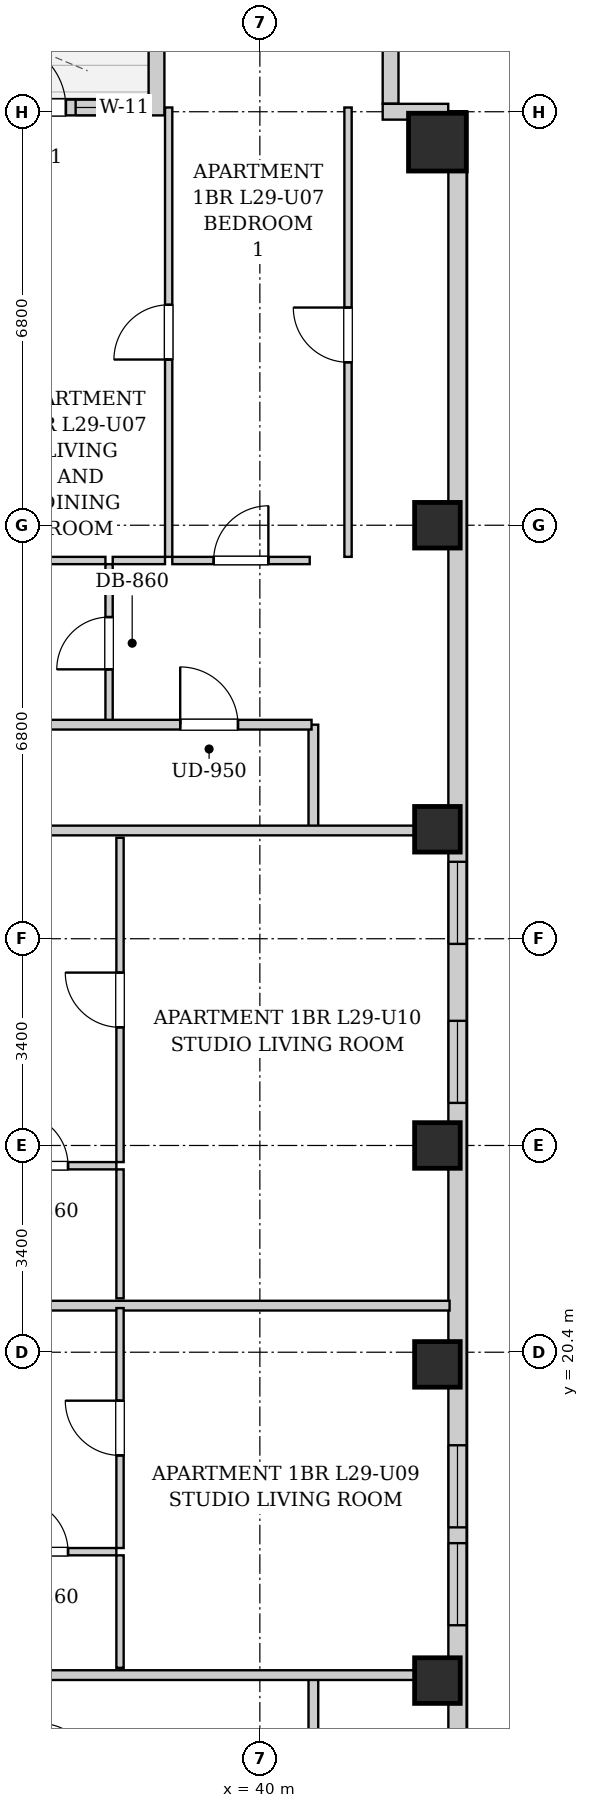
"""IFC4 building model, lengths in metres.
Left out: names, types, materials, properties, quantities, classifications, styles, units other than length and angle.
Written with IfcOpenShell. Run it as: python <this file> out.ifc"""

import sys

from ifc_helpers import new_model, si_unit, direction, frame, frame_2d, origin, origin_2d, place, context, subcontext, project, spatial, rectangle, extrude, element, fill, save


model = new_model("IFC4")
c1 = context("Model", 3, precision=1e-05, world=origin(), true_north=direction((0.0, 1.0)))
c2 = subcontext(c1, "Body", "Model", "MODEL_VIEW")
j1 = project(units=[si_unit("LENGTHUNIT", "METRE"), si_unit("PLANEANGLEUNIT", "RADIAN")], contexts=[c1])
p1 = place(None, origin())
s1 = spatial("IfcSite", under=j1, at=p1, CompositionType="ELEMENT")
p2 = place(p1, origin())
s2 = spatial("IfcBuilding", under=s1, at=p2, CompositionType="ELEMENT")
p3 = place(p2, frame((0.0, 0.0, 103.9)))
s3 = spatial("IfcBuildingStorey", under=s2, at=p3, CompositionType="ELEMENT", Elevation=103.9)
for number, where, z_axis, x_axis in (
    (1, (42.92, 15.0, 0.0), (0.0, 0.0, 1.0), (1.0, 0.0, 0.0)),
    (2, (42.92, 20.2, 0.0), (0.0, 0.0, 1.0), (1.0, 0.0, 0.0)),
    (3, (42.92, 23.8, 0.0), (0.0, 0.0, 1.0), (1.0, 0.0, 0.0)),
    (4, (42.92, 29.0, 0.0), (0.0, 0.0, 1.0), (1.0, 0.0, 0.0)),
    (5, (42.92, 34.0, 0.0), (0.0, 0.0, 1.0), (1.0, 0.0, 0.0)),
):
    element("IfcColumn", number, at=place(p3, frame(where, z_axis=z_axis, x_axis=x_axis)), inside=s3, PredefinedType="COLUMN", context=c2, shape_type="SweptSolid", body=[
        extrude(rectangle(XDim=0.75, YDim=0.75, at=origin_2d()), origin(), (0.0, 0.0, 1.0), 3.2),
    ])
p4 = place(p3, frame((42.92, 40.3, 0.0), z_axis=(0.0, 0.0, 1.0), x_axis=(1.0, 0.0, 0.0)))
e6 = element("IfcColumn", 6, at=p4, inside=s3, PredefinedType="COLUMN", context=c2, shape_type="SweptSolid", body=[
    extrude(rectangle(XDim=0.95, YDim=0.95, at=origin_2d()), origin(), (0.0, 0.0, 1.0), 3.2),
])
p5 = place(p3, frame((33.284, 40.87, 0.0), z_axis=(0.0, 0.0, 1.0), x_axis=(1.0, 0.0, 0.0)))
e7 = element("IfcWall", 7, at=p5, inside=s3, PredefinedType="SOLIDWALL", context=c2, shape_type="SweptSolid", body=[
    extrude(rectangle(XDim=4.882, YDim=0.26, at=frame_2d((2.441, 0.0))), origin(), (0.0, 0.0, 1.0), 2.94),
])
p6 = place(p5, frame((2.426, 0.0, 0.0)))
e8 = element("IfcOpeningElement", 8, at=p6, cuts=e7, PredefinedType="OPENING", context=c2, shape_type="SweptSolid", body=[
    extrude(rectangle(XDim=1.1, YDim=2.0, at=frame_2d((0.55, 1.0))), frame((0.0, 0.14, 0.0), z_axis=(0.0, -1.0, 0.0), x_axis=(1.0, 0.0, 0.0)), (0.0, 0.0, 1.0), 0.28),
])
p7 = place(p5, frame((0.426, 0.0, 0.85)))
e9 = element("IfcOpeningElement", 9, at=p7, cuts=e7, PredefinedType="OPENING", context=c2, shape_type="SweptSolid", body=[
    extrude(rectangle(XDim=1.6, YDim=1.65, at=frame_2d((0.8, 0.825))), frame((0.0, 0.14, 0.0), z_axis=(0.0, -1.0, 0.0), x_axis=(1.0, 0.0, 0.0)), (0.0, 0.0, 1.0), 0.28),
])
p8 = place(p5, frame((3.686, 0.0, 0.55)))
e10 = element("IfcOpeningElement", 10, at=p8, cuts=e7, PredefinedType="OPENING", context=c2, shape_type="SweptSolid", body=[
    extrude(rectangle(XDim=0.85, YDim=1.2, at=frame_2d((0.425, 0.6))), frame((0.0, 0.14, 0.0), z_axis=(0.0, -1.0, 0.0), x_axis=(1.0, 0.0, 0.0)), (0.0, 0.0, 1.0), 0.28),
])
p9 = place(p3, frame((38.3, 40.74, 0.0), z_axis=(0.0, 0.0, 1.0), x_axis=(0.0, 1.0, 0.0)))
e11 = element("IfcWall", 11, at=p9, inside=s3, PredefinedType="SOLIDWALL", context=c2, shape_type="SweptSolid", body=[
    extrude(rectangle(XDim=2.4, YDim=0.26, at=frame_2d((1.2, 0.0))), origin(), (0.0, 0.0, 1.0), 2.94),
])
p10 = place(p3, frame((43.25, 40.8, 0.0), z_axis=(0.0, 0.0, 1.0), x_axis=(0.0, -1.0, 0.0)))
e12 = element("IfcWall", 12, at=p10, inside=s3, PredefinedType="SOLIDWALL", context=c2, shape_type="SweptSolid", body=[
    extrude(rectangle(XDim=38.3, YDim=0.3, at=frame_2d((19.15, 0.0))), origin(), (0.0, 0.0, 1.0), 2.94),
])
p11 = place(p10, frame((33.495, 0.0, 0.55)))
e13 = element("IfcOpeningElement", 13, at=p11, cuts=e12, PredefinedType="OPENING", context=c2, shape_type="SweptSolid", body=[
    extrude(rectangle(XDim=1.35, YDim=1.2, at=frame_2d((0.675, 0.6))), frame((0.0, 0.16, 0.0), z_axis=(0.0, -1.0, 0.0), x_axis=(1.0, 0.0, 0.0)), (0.0, 0.0, 1.0), 0.32),
])
p12 = place(p10, frame((31.735, 0.0, 0.55)))
e14 = element("IfcOpeningElement", 14, at=p12, cuts=e12, PredefinedType="OPENING", context=c2, shape_type="SweptSolid", body=[
    extrude(rectangle(XDim=1.35, YDim=1.2, at=frame_2d((0.675, 0.6))), frame((0.0, 0.16, 0.0), z_axis=(0.0, -1.0, 0.0), x_axis=(1.0, 0.0, 0.0)), (0.0, 0.0, 1.0), 0.32),
])
p13 = place(p10, frame((21.93, 0.0, 0.55)))
e15 = element("IfcOpeningElement", 15, at=p13, cuts=e12, PredefinedType="OPENING", context=c2, shape_type="SweptSolid", body=[
    extrude(rectangle(XDim=1.35, YDim=1.2, at=frame_2d((0.675, 0.6))), frame((0.0, 0.16, 0.0), z_axis=(0.0, -1.0, 0.0), x_axis=(1.0, 0.0, 0.0)), (0.0, 0.0, 1.0), 0.32),
])
p14 = place(p10, frame((23.54, 0.0, 0.55)))
e16 = element("IfcOpeningElement", 16, at=p14, cuts=e12, PredefinedType="OPENING", context=c2, shape_type="SweptSolid", body=[
    extrude(rectangle(XDim=1.35, YDim=1.2, at=frame_2d((0.675, 0.6))), frame((0.0, 0.16, 0.0), z_axis=(0.0, -1.0, 0.0), x_axis=(1.0, 0.0, 0.0)), (0.0, 0.0, 1.0), 0.32),
])
p15 = place(p10, frame((14.95, 0.0, 0.55)))
e17 = element("IfcOpeningElement", 17, at=p15, cuts=e12, PredefinedType="OPENING", context=c2, shape_type="SweptSolid", body=[
    extrude(rectangle(XDim=1.35, YDim=1.2, at=frame_2d((0.675, 0.6))), frame((0.0, 0.16, 0.0), z_axis=(0.0, -1.0, 0.0), x_axis=(1.0, 0.0, 0.0)), (0.0, 0.0, 1.0), 0.32),
])
p16 = place(p10, frame((12.335, 0.0, 0.55)))
e18 = element("IfcOpeningElement", 18, at=p16, cuts=e12, PredefinedType="OPENING", context=c2, shape_type="SweptSolid", body=[
    extrude(rectangle(XDim=1.35, YDim=1.2, at=frame_2d((0.675, 0.6))), frame((0.0, 0.16, 0.0), z_axis=(0.0, -1.0, 0.0), x_axis=(1.0, 0.0, 0.0)), (0.0, 0.0, 1.0), 0.32),
])
p17 = place(p3, frame((42.15, 41.918, 0.0), z_axis=(0.0, 0.0, 1.0), x_axis=(0.0, -1.0, 0.0)))
e19 = element("IfcWall", 19, at=p17, inside=s3, PredefinedType="SOLIDWALL", context=c2, shape_type="SweptSolid", body=[
    extrude(rectangle(XDim=0.986, YDim=0.26, at=frame_2d((0.493, 0.0))), origin(), (0.0, 0.0, 1.0), 2.94),
])
p18 = place(p3, frame((42.02, 40.8, 0.0), z_axis=(0.0, 0.0, 1.0), x_axis=(1.0, 0.0, 0.0)))
e20 = element("IfcWall", 20, at=p18, inside=s3, PredefinedType="SOLIDWALL", context=c2, shape_type="SweptSolid", body=[
    extrude(rectangle(XDim=1.078, YDim=0.26, at=frame_2d((0.539, 0.0))), origin(), (0.0, 0.0, 1.0), 2.94),
])
for number, where, z_axis, x_axis in (
    (21, (40.88, 13.35, 0.0), (0.0, 0.0, 1.0), (0.0, 1.0, 0.0)),
    (22, (40.88, 28.98, 0.0), (0.0, 0.0, 1.0), (0.0, 1.0, 0.0)),
):
    element("IfcWall", number, at=place(p3, frame(where, z_axis=z_axis, x_axis=x_axis)), inside=s3, PredefinedType="PARTITIONING", context=c2, shape_type="SweptSolid", body=[
        extrude(rectangle(XDim=1.74, YDim=0.16, at=frame_2d((0.87, 0.0))), origin(), (0.0, 0.0, 1.0), 2.94),
    ])
for number, where, z_axis, x_axis in (
    (23, (35.11, 15.09, 0.0), (0.0, 0.0, 1.0), (1.0, 0.0, 0.0)),
    (24, (35.11, 28.98, 0.0), (0.0, 0.0, 1.0), (1.0, 0.0, 0.0)),
):
    element("IfcWall", number, at=place(p3, frame(where, z_axis=z_axis, x_axis=x_axis)), inside=s3, PredefinedType="PARTITIONING", context=c2, shape_type="SweptSolid", body=[
        extrude(rectangle(XDim=8.01, YDim=0.16, at=frame_2d((4.005, 0.0))), origin(), (0.0, 0.0, 1.0), 2.313),
    ])
p19 = place(p3, frame((37.52, 30.76, 0.0), z_axis=(0.0, 0.0, 1.0), x_axis=(0.0, 1.0, 0.0)))
e25 = element("IfcWall", 25, at=p19, inside=s3, PredefinedType="PARTITIONING", context=c2, shape_type="SweptSolid", body=[
    extrude(rectangle(XDim=2.6, YDim=0.12, at=frame_2d((1.3, 0.0))), origin(), (0.0, 0.0, 1.0), 2.94),
])
p20 = place(p19, frame((0.87, 0.0, 0.0)))
e26 = element("IfcOpeningElement", 26, at=p20, cuts=e25, PredefinedType="OPENING", context=c2, shape_type="SweptSolid", body=[
    extrude(rectangle(XDim=0.86, YDim=2.05, at=frame_2d((0.43, 1.025))), frame((0.0, 0.07, 0.0), z_axis=(0.0, -1.0, 0.0), x_axis=(1.0, 0.0, 0.0)), (0.0, 0.0, 1.0), 0.14),
])
p21 = place(p3, frame((35.61, 33.42, 0.0), z_axis=(0.0, 0.0, 1.0), x_axis=(1.0, 0.0, 0.0)))
e27 = element("IfcWall", 27, at=p21, inside=s3, PredefinedType="PARTITIONING", context=c2, shape_type="SweptSolid", body=[
    extrude(rectangle(XDim=1.85, YDim=0.12, at=frame_2d((0.925, 0.0))), origin(), (0.0, 0.0, 1.0), 2.94),
])
p22 = place(p3, frame((37.58, 33.42, 0.0), z_axis=(0.0, 0.0, 1.0), x_axis=(1.0, 0.0, 0.0)))
e28 = element("IfcWall", 28, at=p22, inside=s3, PredefinedType="PARTITIONING", context=c2, shape_type="SweptSolid", body=[
    extrude(rectangle(XDim=0.86, YDim=0.12, at=frame_2d((0.43, 0.0))), origin(), (0.0, 0.0, 1.0), 2.94),
])
p23 = place(p3, frame((38.56, 33.42, 0.0), z_axis=(0.0, 0.0, 1.0), x_axis=(1.0, 0.0, 0.0)))
e29 = element("IfcWall", 29, at=p23, inside=s3, PredefinedType="PARTITIONING", context=c2, shape_type="SweptSolid", body=[
    extrude(rectangle(XDim=2.26, YDim=0.12, at=frame_2d((1.13, 0.0))), origin(), (0.0, 0.0, 1.0), 2.94),
])
p24 = place(p23, frame((0.68, 0.0, 0.0)))
e30 = element("IfcOpeningElement", 30, at=p24, cuts=e29, PredefinedType="OPENING", context=c2, shape_type="SweptSolid", body=[
    extrude(rectangle(XDim=0.9, YDim=2.05, at=frame_2d((0.45, 1.025))), frame((0.0, 0.07, 0.0), z_axis=(0.0, -1.0, 0.0), x_axis=(1.0, 0.0, 0.0)), (0.0, 0.0, 1.0), 0.14),
])
p25 = place(p3, frame((38.5, 33.48, 0.0), z_axis=(0.0, 0.0, 1.0), x_axis=(0.0, 1.0, 0.0)))
e31 = element("IfcWall", 31, at=p25, inside=s3, PredefinedType="PARTITIONING", context=c2, shape_type="SweptSolid", body=[
    extrude(rectangle(XDim=7.39, YDim=0.12, at=frame_2d((3.695, 0.0))), origin(), (0.0, 0.0, 1.0), 2.94),
])
p26 = place(p25, frame((3.245, 0.0, 0.0)))
e32 = element("IfcOpeningElement", 32, at=p26, cuts=e31, PredefinedType="OPENING", context=c2, shape_type="SweptSolid", body=[
    extrude(rectangle(XDim=0.9, YDim=2.05, at=frame_2d((0.45, 1.025))), frame((0.0, 0.07, 0.0), z_axis=(0.0, -1.0, 0.0), x_axis=(1.0, 0.0, 0.0)), (0.0, 0.0, 1.0), 0.14),
])
p27 = place(p3, frame((41.45, 33.48, 0.0), z_axis=(0.0, 0.0, 1.0), x_axis=(0.0, 1.0, 0.0)))
e33 = element("IfcWall", 33, at=p27, inside=s3, PredefinedType="PARTITIONING", context=c2, shape_type="SweptSolid", body=[
    extrude(rectangle(XDim=7.39, YDim=0.12, at=frame_2d((3.695, 0.0))), origin(), (0.0, 0.0, 1.0), 2.94),
])
p28 = place(p27, frame((3.2, 0.0, 0.0)))
e34 = element("IfcOpeningElement", 34, at=p28, cuts=e33, PredefinedType="OPENING", context=c2, shape_type="SweptSolid", body=[
    extrude(rectangle(XDim=0.9, YDim=2.05, at=frame_2d((0.45, 1.025))), frame((0.0, 0.07, 0.0), z_axis=(0.0, -1.0, 0.0), x_axis=(1.0, 0.0, 0.0)), (0.0, 0.0, 1.0), 0.14),
])
p29 = place(p3, frame((35.19, 21.166, 0.0), z_axis=(0.0, 0.0, 1.0), x_axis=(1.0, 0.0, 0.0)))
e35 = element("IfcWall", 35, at=p29, inside=s3, PredefinedType="PARTITIONING", context=c2, shape_type="SweptSolid", body=[
    extrude(rectangle(XDim=7.93, YDim=0.16, at=frame_2d((3.965, 0.0))), origin(), (0.0, 0.0, 1.0), 2.94),
])
p30 = place(p3, frame((35.19, 17.12, 0.0), z_axis=(0.0, 0.0, 1.0), x_axis=(1.0, 0.0, 0.0)))
e36 = element("IfcWall", 36, at=p30, inside=s3, PredefinedType="PARTITIONING", context=c2, shape_type="SweptSolid", body=[
    extrude(rectangle(XDim=2.45, YDim=0.12, at=frame_2d((1.225, 0.0))), origin(), (0.0, 0.0, 1.0), 2.94),
])
p31 = place(p30, frame((0.795, 0.0, 0.0)))
e37 = element("IfcOpeningElement", 37, at=p31, cuts=e36, PredefinedType="OPENING", context=c2, shape_type="SweptSolid", body=[
    extrude(rectangle(XDim=0.86, YDim=2.05, at=frame_2d((0.43, 1.025))), frame((0.0, 0.07, 0.0), z_axis=(0.0, -1.0, 0.0), x_axis=(1.0, 0.0, 0.0)), (0.0, 0.0, 1.0), 0.14),
])
p32 = place(p3, frame((37.7, 15.21, 0.0), z_axis=(0.0, 0.0, 1.0), x_axis=(0.0, 1.0, 0.0)))
e38 = element("IfcWall", 38, at=p32, inside=s3, PredefinedType="PARTITIONING", context=c2, shape_type="SweptSolid", body=[
    extrude(rectangle(XDim=1.85, YDim=0.12, at=frame_2d((0.925, 0.0))), origin(), (0.0, 0.0, 1.0), 2.94),
])
p33 = place(p3, frame((37.7, 17.18, 0.0), z_axis=(0.0, 0.0, 1.0), x_axis=(0.0, 1.0, 0.0)))
e39 = element("IfcWall", 39, at=p33, inside=s3, PredefinedType="PARTITIONING", context=c2, shape_type="SweptSolid", body=[
    extrude(rectangle(XDim=3.946, YDim=0.12, at=frame_2d((1.973, 0.0))), origin(), (0.0, 0.0, 1.0), 2.94),
])
p34 = place(p33, frame((1.523, 0.0, 0.0)))
e40 = element("IfcOpeningElement", 40, at=p34, cuts=e39, PredefinedType="OPENING", context=c2, shape_type="SweptSolid", body=[
    extrude(rectangle(XDim=0.9, YDim=2.05, at=frame_2d((0.45, 1.025))), frame((0.0, 0.07, 0.0), z_axis=(0.0, -1.0, 0.0), x_axis=(1.0, 0.0, 0.0)), (0.0, 0.0, 1.0), 0.14),
])
p35 = place(p3, frame((35.19, 23.467, 0.0), z_axis=(0.0, 0.0, 1.0), x_axis=(1.0, 0.0, 0.0)))
e41 = element("IfcWall", 41, at=p35, inside=s3, PredefinedType="PARTITIONING", context=c2, shape_type="SweptSolid", body=[
    extrude(rectangle(XDim=2.45, YDim=0.12, at=frame_2d((1.225, 0.0))), origin(), (0.0, 0.0, 1.0), 2.94),
])
p36 = place(p35, frame((0.795, 0.0, 0.0)))
e42 = element("IfcOpeningElement", 42, at=p36, cuts=e41, PredefinedType="OPENING", context=c2, shape_type="SweptSolid", body=[
    extrude(rectangle(XDim=0.86, YDim=2.05, at=frame_2d((0.43, 1.025))), frame((0.0, 0.07, 0.0), z_axis=(0.0, -1.0, 0.0), x_axis=(1.0, 0.0, 0.0)), (0.0, 0.0, 1.0), 0.14),
])
p37 = place(p3, frame((37.7, 21.286, 0.0), z_axis=(0.0, 0.0, 1.0), x_axis=(0.0, 1.0, 0.0)))
e43 = element("IfcWall", 43, at=p37, inside=s3, PredefinedType="PARTITIONING", context=c2, shape_type="SweptSolid", body=[
    extrude(rectangle(XDim=2.121, YDim=0.12, at=frame_2d((1.061, 0.0))), origin(), (0.0, 0.0, 1.0), 2.94),
])
p38 = place(p3, frame((37.7, 23.527, 0.0), z_axis=(0.0, 0.0, 1.0), x_axis=(0.0, 1.0, 0.0)))
e44 = element("IfcWall", 44, at=p38, inside=s3, PredefinedType="PARTITIONING", context=c2, shape_type="SweptSolid", body=[
    extrude(rectangle(XDim=5.333, YDim=0.12, at=frame_2d((2.667, 0.0))), origin(), (0.0, 0.0, 1.0), 2.94),
])
p39 = place(p38, frame((2.216, 0.0, 0.0)))
e45 = element("IfcOpeningElement", 45, at=p39, cuts=e44, PredefinedType="OPENING", context=c2, shape_type="SweptSolid", body=[
    extrude(rectangle(XDim=0.9, YDim=2.05, at=frame_2d((0.45, 1.025))), frame((0.0, 0.07, 0.0), z_axis=(0.0, -1.0, 0.0), x_axis=(1.0, 0.0, 0.0)), (0.0, 0.0, 1.0), 0.14),
])
p40 = place(p3, frame((10.05, 30.72, 0.0), z_axis=(0.0, 0.0, 1.0), x_axis=(1.0, 0.0, 0.0)))
e46 = element("IfcWall", 46, at=p40, inside=s3, PredefinedType="PARTITIONING", context=c2, shape_type="SweptSolid", body=[
    extrude(rectangle(XDim=30.8, YDim=0.16, at=frame_2d((15.4, 0.0))), origin(), (0.0, 0.0, 1.0), 2.94),
])
p41 = place(p40, frame((3.692, 0.0, 0.0)))
e47 = element("IfcOpeningElement", 47, at=p41, cuts=e46, PredefinedType="OPENING", context=c2, shape_type="SweptSolid", body=[
    extrude(rectangle(XDim=0.95, YDim=2.1, at=frame_2d((0.475, 1.05))), frame((0.0, 0.09, 0.0), z_axis=(0.0, -1.0, 0.0), x_axis=(1.0, 0.0, 0.0)), (0.0, 0.0, 1.0), 0.18),
])
p42 = place(p40, frame((11.785, 0.0, 0.0)))
e48 = element("IfcOpeningElement", 48, at=p42, cuts=e46, PredefinedType="OPENING", context=c2, shape_type="SweptSolid", body=[
    extrude(rectangle(XDim=0.95, YDim=2.1, at=frame_2d((0.475, 1.05))), frame((0.0, 0.09, 0.0), z_axis=(0.0, -1.0, 0.0), x_axis=(1.0, 0.0, 0.0)), (0.0, 0.0, 1.0), 0.18),
])
p43 = place(p40, frame((17.235, 0.0, 0.0)))
e49 = element("IfcOpeningElement", 49, at=p43, cuts=e46, PredefinedType="OPENING", context=c2, shape_type="SweptSolid", body=[
    extrude(rectangle(XDim=0.95, YDim=2.1, at=frame_2d((0.475, 1.05))), frame((0.0, 0.09, 0.0), z_axis=(0.0, -1.0, 0.0), x_axis=(1.0, 0.0, 0.0)), (0.0, 0.0, 1.0), 0.18),
])
p44 = place(p40, frame((28.64, 0.0, 0.0)))
e50 = element("IfcOpeningElement", 50, at=p44, cuts=e46, PredefinedType="OPENING", context=c2, shape_type="SweptSolid", body=[
    extrude(rectangle(XDim=0.95, YDim=2.1, at=frame_2d((0.475, 1.05))), frame((0.0, 0.09, 0.0), z_axis=(0.0, -1.0, 0.0), x_axis=(1.0, 0.0, 0.0)), (0.0, 0.0, 1.0), 0.18),
])
p45 = place(p20, origin())
e51 = element("IfcDoor", 51, at=p45, inside=s3, OperationType="SINGLE_SWING_LEFT", PredefinedType="DOOR", context=c2, shape_type="SweptSolid", body=[
    extrude(rectangle(XDim=0.86, YDim=2.05, at=frame_2d((0.43, 1.025))), frame((0.0, 0.025, 0.0), z_axis=(0.0, -1.0, 0.0), x_axis=(1.0, 0.0, 0.0)), (0.0, 0.0, 1.0), 0.05),
])
fill(e26, e51)
p46 = place(p24, origin())
e52 = element("IfcDoor", 52, at=p46, inside=s3, OperationType="SINGLE_SWING_RIGHT", PredefinedType="DOOR", context=c2, shape_type="SweptSolid", body=[
    extrude(rectangle(XDim=0.9, YDim=2.05, at=frame_2d((0.45, 1.025))), frame((0.0, 0.025, 0.0), z_axis=(0.0, -1.0, 0.0), x_axis=(1.0, 0.0, 0.0)), (0.0, 0.0, 1.0), 0.05),
])
fill(e30, e52)
p47 = place(p26, origin())
e53 = element("IfcDoor", 53, at=p47, inside=s3, OperationType="SINGLE_SWING_LEFT", PredefinedType="DOOR", context=c2, shape_type="SweptSolid", body=[
    extrude(rectangle(XDim=0.9, YDim=2.05, at=frame_2d((0.45, 1.025))), frame((0.0, 0.025, 0.0), z_axis=(0.0, -1.0, 0.0), x_axis=(1.0, 0.0, 0.0)), (0.0, 0.0, 1.0), 0.05),
])
fill(e32, e53)
p48 = place(p28, origin())
e54 = element("IfcDoor", 54, at=p48, inside=s3, OperationType="SINGLE_SWING_RIGHT", PredefinedType="DOOR", context=c2, shape_type="SweptSolid", body=[
    extrude(rectangle(XDim=0.9, YDim=2.05, at=frame_2d((0.45, 1.025))), frame((0.0, 0.025, 0.0), z_axis=(0.0, -1.0, 0.0), x_axis=(1.0, 0.0, 0.0)), (0.0, 0.0, 1.0), 0.05),
])
fill(e34, e54)
p49 = place(p31, origin())
e55 = element("IfcDoor", 55, at=p49, inside=s3, OperationType="SINGLE_SWING_LEFT", PredefinedType="DOOR", context=c2, shape_type="SweptSolid", body=[
    extrude(rectangle(XDim=0.86, YDim=2.05, at=frame_2d((0.43, 1.025))), frame((0.0, 0.025, 0.0), z_axis=(0.0, -1.0, 0.0), x_axis=(1.0, 0.0, 0.0)), (0.0, 0.0, 1.0), 0.05),
])
fill(e37, e55)
p50 = place(p34, origin())
e56 = element("IfcDoor", 56, at=p50, inside=s3, OperationType="SINGLE_SWING_RIGHT", PredefinedType="DOOR", context=c2, shape_type="SweptSolid", body=[
    extrude(rectangle(XDim=0.9, YDim=2.05, at=frame_2d((0.45, 1.025))), frame((0.0, 0.025, 0.0), z_axis=(0.0, -1.0, 0.0), x_axis=(1.0, 0.0, 0.0)), (0.0, 0.0, 1.0), 0.05),
])
fill(e40, e56)
p51 = place(p36, origin())
e57 = element("IfcDoor", 57, at=p51, inside=s3, OperationType="SINGLE_SWING_LEFT", PredefinedType="DOOR", context=c2, shape_type="SweptSolid", body=[
    extrude(rectangle(XDim=0.86, YDim=2.05, at=frame_2d((0.43, 1.025))), frame((0.0, 0.025, 0.0), z_axis=(0.0, -1.0, 0.0), x_axis=(1.0, 0.0, 0.0)), (0.0, 0.0, 1.0), 0.05),
])
fill(e42, e57)
p52 = place(p39, origin())
e58 = element("IfcDoor", 58, at=p52, inside=s3, OperationType="SINGLE_SWING_RIGHT", PredefinedType="DOOR", context=c2, shape_type="SweptSolid", body=[
    extrude(rectangle(XDim=0.9, YDim=2.05, at=frame_2d((0.45, 1.025))), frame((0.0, 0.025, 0.0), z_axis=(0.0, -1.0, 0.0), x_axis=(1.0, 0.0, 0.0)), (0.0, 0.0, 1.0), 0.05),
])
fill(e45, e58)
p53 = place(p44, origin())
e59 = element("IfcDoor", 59, at=p53, inside=s3, OperationType="SINGLE_SWING_LEFT", PredefinedType="DOOR", context=c2, shape_type="SweptSolid", body=[
    extrude(rectangle(XDim=0.95, YDim=2.1, at=frame_2d((0.475, 1.05))), frame((0.0, 0.025, 0.0), z_axis=(0.0, -1.0, 0.0), x_axis=(1.0, 0.0, 0.0)), (0.0, 0.0, 1.0), 0.05),
])
fill(e50, e59)
p54 = place(p6, origin())
e60 = element("IfcDoor", 60, at=p54, inside=s3, OperationType="SINGLE_SWING_LEFT", PredefinedType="DOOR", context=c2, shape_type="SweptSolid", body=[
    extrude(rectangle(XDim=1.1, YDim=2.0, at=frame_2d((0.55, 1.0))), frame((0.0, 0.025, 0.0), z_axis=(0.0, -1.0, 0.0), x_axis=(1.0, 0.0, 0.0)), (0.0, 0.0, 1.0), 0.05),
])
fill(e8, e60)
p55 = place(p8, origin())
e61 = element("IfcWindow", 61, at=p55, inside=s3, PartitioningType="SINGLE_PANEL", PredefinedType="WINDOW", context=c2, shape_type="SweptSolid", body=[
    extrude(rectangle(XDim=0.85, YDim=1.2, at=frame_2d((0.425, 0.6))), frame((0.0, 0.03, 0.0), z_axis=(0.0, -1.0, 0.0), x_axis=(1.0, 0.0, 0.0)), (0.0, 0.0, 1.0), 0.06),
])
fill(e10, e61)
p56 = place(p13, origin())
e62 = element("IfcWindow", 62, at=p56, inside=s3, PartitioningType="SINGLE_PANEL", PredefinedType="WINDOW", context=c2, shape_type="SweptSolid", body=[
    extrude(rectangle(XDim=1.35, YDim=1.2, at=frame_2d((0.675, 0.6))), frame((0.0, 0.03, 0.0), z_axis=(0.0, -1.0, 0.0), x_axis=(1.0, 0.0, 0.0)), (0.0, 0.0, 1.0), 0.06),
])
fill(e15, e62)
p57 = place(p14, origin())
e63 = element("IfcWindow", 63, at=p57, inside=s3, PartitioningType="SINGLE_PANEL", PredefinedType="WINDOW", context=c2, shape_type="SweptSolid", body=[
    extrude(rectangle(XDim=1.35, YDim=1.2, at=frame_2d((0.675, 0.6))), frame((0.0, 0.03, 0.0), z_axis=(0.0, -1.0, 0.0), x_axis=(1.0, 0.0, 0.0)), (0.0, 0.0, 1.0), 0.06),
])
fill(e16, e63)
p58 = place(p15, origin())
e64 = element("IfcWindow", 64, at=p58, inside=s3, PartitioningType="SINGLE_PANEL", PredefinedType="WINDOW", context=c2, shape_type="SweptSolid", body=[
    extrude(rectangle(XDim=1.35, YDim=1.2, at=frame_2d((0.675, 0.6))), frame((0.0, 0.03, 0.0), z_axis=(0.0, -1.0, 0.0), x_axis=(1.0, 0.0, 0.0)), (0.0, 0.0, 1.0), 0.06),
])
fill(e17, e64)
p59 = place(p16, origin())
e65 = element("IfcWindow", 65, at=p59, inside=s3, PartitioningType="SINGLE_PANEL", PredefinedType="WINDOW", context=c2, shape_type="SweptSolid", body=[
    extrude(rectangle(XDim=1.35, YDim=1.2, at=frame_2d((0.675, 0.6))), frame((0.0, 0.03, 0.0), z_axis=(0.0, -1.0, 0.0), x_axis=(1.0, 0.0, 0.0)), (0.0, 0.0, 1.0), 0.06),
])
fill(e18, e65)
save(model, sys.argv[1])
